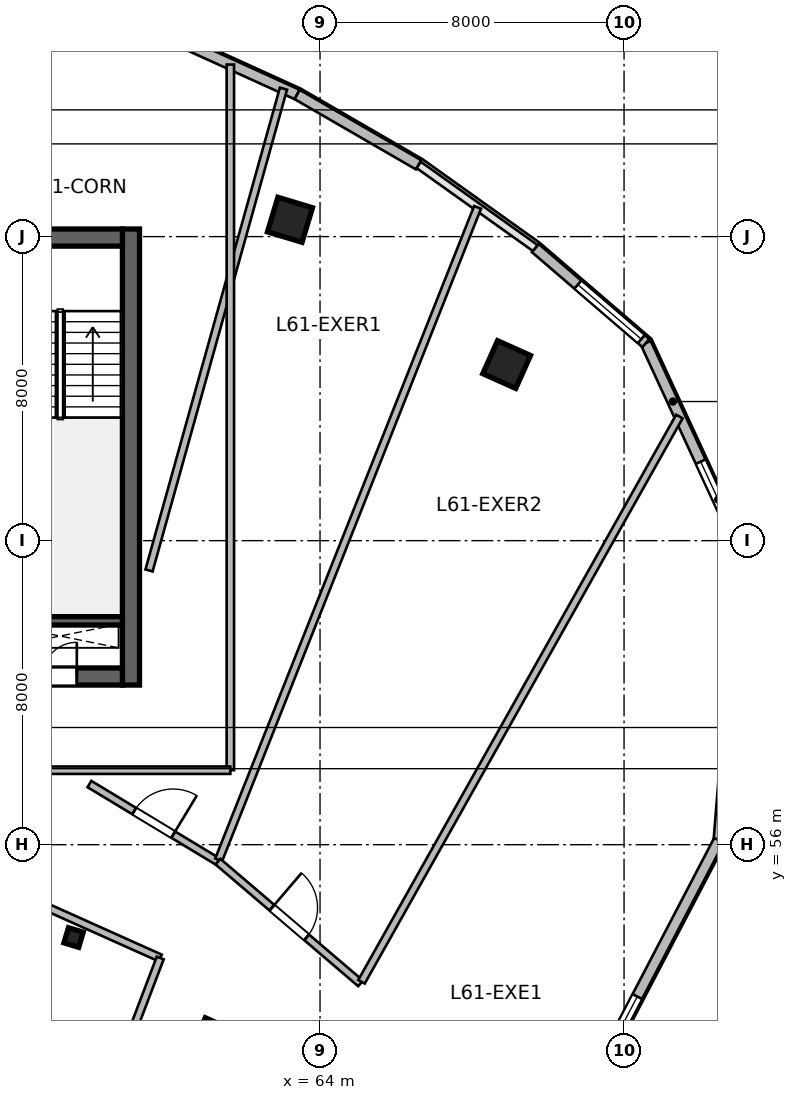
"""IFC4 building model, lengths in metres.
Left out: names, types, materials, properties, quantities, classifications, styles, units other than length and angle.
Written with IfcOpenShell. Run it as: python <this file> out.ifc"""

import sys

from ifc_helpers import new_model, si_unit, direction, frame, frame_2d, origin, origin_2d, place, context, subcontext, project, spatial, rectangle, i_section, extrude, source, transform, mapped, element, fill, save


model = new_model("IFC4")
c1 = context("Model", 3, precision=1e-05, world=origin(), true_north=direction((0.0, 1.0)))
c2 = subcontext(c1, "Body", "Model", "MODEL_VIEW")
j1 = project(units=[si_unit("LENGTHUNIT", "METRE"), si_unit("PLANEANGLEUNIT", "RADIAN")], contexts=[c1])
p1 = place(None, origin())
s1 = spatial("IfcSite", under=j1, at=p1, CompositionType="ELEMENT")
p2 = place(p1, origin())
s2 = spatial("IfcBuilding", under=s1, at=p2, CompositionType="ELEMENT")
p3 = place(p2, frame((0.0, 0.0, 250.8)))
s3 = spatial("IfcBuildingStorey", under=s2, at=p3, CompositionType="ELEMENT", Elevation=250.8)
m1 = source(origin(), c2, "Body", "SweptSolid", [
    extrude(rectangle(XDim=12.0, YDim=0.45, at=frame_2d((6.0, 0.0))), origin(), (0.0, 0.0, 1.0), 3.9),
])
p4 = place(p3, frame((59.025, 60.2, 0.0), z_axis=(0.0, 0.0, 1.0), x_axis=(0.0, 1.0, 0.0)))
e1 = element("IfcWall", 1, at=p4, inside=s3, PredefinedType="SHEAR", context=c2, shape_type="MappedRepresentation", body=[
    mapped(m1, transform((0.0, 0.0, 0.0), scale=1.0)),
])
m2 = source(origin(), c2, "Body", "SweptSolid", [
    extrude(rectangle(XDim=21.6, YDim=0.45, at=frame_2d((10.8, 0.0))), origin(), (0.0, 0.0, 1.0), 3.9),
])
p5 = place(p3, frame((37.2, 60.425, 0.0), z_axis=(0.0, 0.0, 1.0), x_axis=(1.0, 0.0, 0.0)))
e2 = element("IfcWall", 2, at=p5, inside=s3, PredefinedType="SHEAR", context=c2, shape_type="MappedRepresentation", body=[
    mapped(m2, transform((0.0, 0.0, 0.0), scale=1.0)),
])
p6 = place(p5, frame((1.1, 0.0, 0.0)))
e3 = element("IfcOpeningElement", 3, at=p6, cuts=e2, PredefinedType="OPENING", context=c2, shape_type="SweptSolid", body=[
    extrude(rectangle(XDim=1.15, YDim=2.15, at=frame_2d((0.575, 1.075))), frame((0.0, 0.235, 0.0), z_axis=(0.0, -1.0, 0.0), x_axis=(1.0, 0.0, 0.0)), (0.0, 0.0, 1.0), 0.47),
])
p7 = place(p5, frame((19.5, 0.0, 0.0)))
e4 = element("IfcOpeningElement", 4, at=p7, cuts=e2, PredefinedType="OPENING", context=c2, shape_type="SweptSolid", body=[
    extrude(rectangle(XDim=0.9, YDim=2.1, at=frame_2d((0.45, 1.05))), frame((0.0, 0.235, 0.0), z_axis=(0.0, -1.0, 0.0), x_axis=(1.0, 0.0, 0.0)), (0.0, 0.0, 1.0), 0.47),
])
p8 = place(p5, frame((12.02, 0.0, 0.0)))
e5 = element("IfcOpeningElement", 5, at=p8, cuts=e2, PredefinedType="OPENING", context=c2, shape_type="SweptSolid", body=[
    extrude(rectangle(XDim=1.6, YDim=2.15, at=frame_2d((0.8, 1.075))), frame((0.0, 0.235, 0.0), z_axis=(0.0, -1.0, 0.0), x_axis=(1.0, 0.0, 0.0)), (0.0, 0.0, 1.0), 0.47),
])
p9 = place(p3, frame((37.2, 71.975, 0.0), z_axis=(0.0, 0.0, 1.0), x_axis=(1.0, 0.0, 0.0)))
e6 = element("IfcWall", 6, at=p9, inside=s3, PredefinedType="SHEAR", context=c2, shape_type="MappedRepresentation", body=[
    mapped(m2, transform((0.0, 0.0, 0.0), scale=1.0)),
])
p10 = place(p9, frame((1.2, 0.0, 0.0)))
e7 = element("IfcOpeningElement", 7, at=p10, cuts=e6, PredefinedType="OPENING", context=c2, shape_type="SweptSolid", body=[
    extrude(rectangle(XDim=0.9, YDim=2.1, at=frame_2d((0.45, 1.05))), frame((0.0, 0.235, 0.0), z_axis=(0.0, -1.0, 0.0), x_axis=(1.0, 0.0, 0.0)), (0.0, 0.0, 1.0), 0.47),
])
p11 = place(p9, frame((14.7, 0.0, 0.0)))
e8 = element("IfcOpeningElement", 8, at=p11, cuts=e6, PredefinedType="OPENING", context=c2, shape_type="SweptSolid", body=[
    extrude(rectangle(XDim=1.2, YDim=2.15, at=frame_2d((0.6, 1.075))), frame((0.0, 0.235, 0.0), z_axis=(0.0, -1.0, 0.0), x_axis=(1.0, 0.0, 0.0)), (0.0, 0.0, 1.0), 0.47),
])
p12 = place(p9, frame((4.15, 0.0, 0.0)))
e9 = element("IfcOpeningElement", 9, at=p12, cuts=e6, PredefinedType="OPENING", context=c2, shape_type="SweptSolid", body=[
    extrude(rectangle(XDim=1.3, YDim=2.15, at=frame_2d((0.65, 1.075))), frame((0.0, 0.235, 0.0), z_axis=(0.0, -1.0, 0.0), x_axis=(1.0, 0.0, 0.0)), (0.0, 0.0, 1.0), 0.47),
])
p13 = place(p9, frame((7.25, 0.0, 0.0)))
e10 = element("IfcOpeningElement", 10, at=p13, cuts=e6, PredefinedType="OPENING", context=c2, shape_type="SweptSolid", body=[
    extrude(rectangle(XDim=0.9, YDim=2.1, at=frame_2d((0.45, 1.05))), frame((0.0, 0.235, 0.0), z_axis=(0.0, -1.0, 0.0), x_axis=(1.0, 0.0, 0.0)), (0.0, 0.0, 1.0), 0.47),
])
m3 = source(origin(), c2, "Body", "SweptSolid", [
    extrude(rectangle(XDim=3.27, YDim=0.22, at=frame_2d((1.635, 0.0))), origin(), (0.0, 0.0, 1.0), 3.9),
])
p14 = place(p3, frame((55.53, 61.89, 0.0), z_axis=(0.0, 0.0, 1.0), x_axis=(1.0, 0.0, 0.0)))
e11 = element("IfcWall", 11, at=p14, inside=s3, PredefinedType="SHEAR", context=c2, shape_type="MappedRepresentation", body=[
    mapped(m3, transform((0.0, 0.0, 0.0), scale=1.0)),
])
m4 = source(origin(), c2, "Body", "SweptSolid", [
    extrude(i_section(OverallWidth=0.406, OverallDepth=0.416, WebThickness=0.03, FlangeThickness=0.048, at=origin_2d()), origin(), (0.0, 0.0, 1.0), 3.9),
])
p15 = place(p3, frame((57.515, 53.558, 0.0), z_axis=(0.0, 0.0, 1.0), x_axis=(0.288697611798, 0.957420330337, 0.0)))
e12 = element("IfcColumn", 12, at=p15, inside=s3, PredefinedType="COLUMN", context=c2, shape_type="MappedRepresentation", body=[
    mapped(m4, transform((0.0, 0.0, 0.0), scale=1.0)),
])
m5 = source(origin(), c2, "Body", "SweptSolid", [
    extrude(rectangle(XDim=0.95, YDim=0.95, at=origin_2d()), origin(), (0.0, 0.0, 1.0), 3.9),
])
p16 = place(p3, frame((63.209, 72.442, 0.0), z_axis=(0.0, 0.0, 1.0), x_axis=(0.288697611798, 0.957420330337, 0.0)))
e13 = element("IfcColumn", 13, at=p16, inside=s3, PredefinedType="COLUMN", context=c2, shape_type="MappedRepresentation", body=[
    mapped(m5, transform((0.0, 0.0, 0.0), scale=1.0)),
])
p17 = place(p3, frame((61.082, 51.175, 0.0), z_axis=(0.0, 0.0, 1.0), x_axis=(0.409126902895, 0.912477494148, 0.0)))
e14 = element("IfcColumn", 14, at=p17, inside=s3, PredefinedType="COLUMN", context=c2, shape_type="MappedRepresentation", body=[
    mapped(m4, transform((0.0, 0.0, 0.0), scale=1.0)),
])
p18 = place(p3, frame((68.91, 68.633, 0.0), z_axis=(0.0, 0.0, 1.0), x_axis=(0.409126902895, 0.912477494148, 0.0)))
e15 = element("IfcColumn", 15, at=p18, inside=s3, PredefinedType="COLUMN", context=c2, shape_type="MappedRepresentation", body=[
    mapped(m5, transform((0.0, 0.0, 0.0), scale=1.0)),
])
m6 = source(origin(), c2, "Body", "SweptSolid", [
    extrude(rectangle(XDim=6.05, YDim=0.28, at=frame_2d((3.025, 0.0))), origin(), (0.0, 0.0, 1.0), 3.58),
])
p19 = place(p3, frame((72.574, 69.198, 0.0), z_axis=(0.0, 0.0, 1.0), x_axis=(0.41942922905, -0.907788037935, 0.0)))
e16 = element("IfcWall", 16, at=p19, inside=s3, PredefinedType="SOLIDWALL", context=c2, shape_type="MappedRepresentation", body=[
    mapped(m6, transform((0.0, 0.0, 0.0), scale=1.0)),
])
p20 = place(p19, frame((3.437, 0.0, 0.95)))
e17 = element("IfcOpeningElement", 17, at=p20, cuts=e16, PredefinedType="OPENING", context=c2, shape_type="SweptSolid", body=[
    extrude(rectangle(XDim=2.2, YDim=2.1, at=frame_2d((1.1, 1.05))), frame((0.0, 0.15, 0.0), z_axis=(0.0, -1.0, 0.0), x_axis=(1.0, 0.0, 0.0)), (0.0, 0.0, 1.0), 0.3),
])
m7 = source(origin(), c2, "Body", "SweptSolid", [
    extrude(rectangle(XDim=7.618, YDim=0.28, at=frame_2d((3.809, 0.0))), origin(), (0.0, 0.0, 1.0), 3.58),
])
p21 = place(p3, frame((75.112, 63.707, 0.0), z_axis=(0.0, 0.0, 1.0), x_axis=(-0.080820171031, -0.996728699273, 0.0)))
e18 = element("IfcWall", 18, at=p21, inside=s3, PredefinedType="SOLIDWALL", context=c2, shape_type="MappedRepresentation", body=[
    mapped(m7, transform((0.0, 0.0, 0.0), scale=1.0)),
])
p22 = place(p21, frame((0.805, 0.0, 0.95)))
e19 = element("IfcOpeningElement", 19, at=p22, cuts=e18, PredefinedType="OPENING", context=c2, shape_type="SweptSolid", body=[
    extrude(rectangle(XDim=2.2, YDim=2.1, at=frame_2d((1.1, 1.05))), frame((0.0, 0.15, 0.0), z_axis=(0.0, -1.0, 0.0), x_axis=(1.0, 0.0, 0.0)), (0.0, 0.0, 1.0), 0.3),
])
m8 = source(origin(), c2, "Body", "SweptSolid", [
    extrude(rectangle(XDim=7.648, YDim=0.28, at=frame_2d((3.824, 0.0))), origin(), (0.0, 0.0, 1.0), 3.58),
])
p23 = place(p3, frame((74.496, 56.113, 0.0), z_axis=(0.0, 0.0, 1.0), x_axis=(-0.463116873665, -0.886297219519, 0.0)))
e20 = element("IfcWall", 20, at=p23, inside=s3, PredefinedType="SOLIDWALL", context=c2, shape_type="MappedRepresentation", body=[
    mapped(m8, transform((0.0, 0.0, 0.0), scale=1.0)),
])
p24 = place(p23, frame((4.636, 0.0, 0.95)))
e21 = element("IfcOpeningElement", 21, at=p24, cuts=e20, PredefinedType="OPENING", context=c2, shape_type="SweptSolid", body=[
    extrude(rectangle(XDim=2.2, YDim=2.1, at=frame_2d((1.1, 1.05))), frame((0.0, 0.15, 0.0), z_axis=(0.0, -1.0, 0.0), x_axis=(1.0, 0.0, 0.0)), (0.0, 0.0, 1.0), 0.3),
])
m9 = source(origin(), c2, "Body", "SweptSolid", [
    extrude(rectangle(XDim=3.619, YDim=0.28, at=frame_2d((1.81, 0.0))), origin(), (0.0, 0.0, 1.0), 3.58),
])
p25 = place(p3, frame((60.103, 77.237, 0.0), z_axis=(0.0, 0.0, 1.0), x_axis=(0.910479634963, -0.413553907391, 0.0)))
e22 = element("IfcWall", 22, at=p25, inside=s3, PredefinedType="SOLIDWALL", context=c2, shape_type="MappedRepresentation", body=[
    mapped(m9, transform((0.0, 0.0, 0.0), scale=1.0)),
])
m10 = source(origin(), c2, "Body", "SweptSolid", [
    extrude(rectangle(XDim=3.692, YDim=0.28, at=frame_2d((1.846, 0.0))), origin(), (0.0, 0.0, 1.0), 3.58),
])
p26 = place(p3, frame((63.398, 75.74, 0.0), z_axis=(0.0, 0.0, 1.0), x_axis=(0.86534327136, -0.501179631181, 0.0)))
e23 = element("IfcWall", 23, at=p26, inside=s3, PredefinedType="SOLIDWALL", context=c2, shape_type="MappedRepresentation", body=[
    mapped(m10, transform((0.0, 0.0, 0.0), scale=1.0)),
])
m11 = source(origin(), c2, "Body", "SweptSolid", [
    extrude(rectangle(XDim=3.834, YDim=0.28, at=frame_2d((1.917, 0.0))), origin(), (0.0, 0.0, 1.0), 3.58),
])
p27 = place(p3, frame((69.667, 71.697, 0.0), z_axis=(0.0, 0.0, 1.0), x_axis=(0.75839292431, -0.651797646787, 0.0)))
e24 = element("IfcWall", 24, at=p27, inside=s3, PredefinedType="SOLIDWALL", context=c2, shape_type="MappedRepresentation", body=[
    mapped(m11, transform((0.0, 0.0, 0.0), scale=1.0)),
])
p28 = place(p27, frame((1.474, 0.0, 0.95)))
e25 = element("IfcOpeningElement", 25, at=p28, cuts=e24, PredefinedType="OPENING", context=c2, shape_type="SweptSolid", body=[
    extrude(rectangle(XDim=2.2, YDim=2.1, at=frame_2d((1.1, 1.05))), frame((0.0, 0.15, 0.0), z_axis=(0.0, -1.0, 0.0), x_axis=(1.0, 0.0, 0.0)), (0.0, 0.0, 1.0), 0.3),
])
m12 = source(origin(), c2, "Body", "SweptSolid", [
    extrude(rectangle(XDim=7.982, YDim=0.195, at=frame_2d((3.991, 0.0))), origin(), (0.0, 0.0, 1.0), 3.58),
])
p29 = place(p3, frame((52.511, 56.284, 0.0), z_axis=(0.0, 0.0, 1.0), x_axis=(0.91248609472, -0.409107720464, 0.0)))
e26 = element("IfcWall", 26, at=p29, inside=s3, PredefinedType="PARTITIONING", context=c2, shape_type="MappedRepresentation", body=[
    mapped(m12, transform((0.0, 0.0, 0.0), scale=1.0)),
])
p30 = place(p29, frame((3.441, 0.0, 0.0)))
e27 = element("IfcOpeningElement", 27, at=p30, cuts=e26, PredefinedType="OPENING", context=c2, shape_type="SweptSolid", body=[
    extrude(rectangle(XDim=1.1, YDim=2.15, at=frame_2d((0.55, 1.075))), frame((0.0, 0.107, 0.0), z_axis=(0.0, -1.0, 0.0), x_axis=(1.0, 0.0, 0.0)), (0.0, 0.0, 1.0), 0.215),
])
m13 = source(origin(), c2, "Body", "SweptSolid", [
    extrude(rectangle(XDim=3.757, YDim=0.195, at=frame_2d((1.879, 0.0))), origin(), (0.0, 0.0, 1.0), 3.58),
])
p31 = place(p3, frame((58.459, 49.507, 0.0), z_axis=(0.0, 0.0, 1.0), x_axis=(0.355427833237, 0.93470372598, 0.0)))
e28 = element("IfcWall", 28, at=p31, inside=s3, PredefinedType="PARTITIONING", context=c2, shape_type="MappedRepresentation", body=[
    mapped(m13, transform((0.0, 0.0, 0.0), scale=1.0)),
])
m14 = source(origin(), c2, "Body", "SweptSolid", [
    extrude(rectangle(XDim=3.951, YDim=0.195, at=frame_2d((1.975, 0.0))), origin(), (0.0, 0.0, 1.0), 3.58),
])
p32 = place(p3, frame((57.932, 57.596, 0.0), z_axis=(0.0, 0.0, 1.0), x_axis=(0.856137696849, -0.51674775668, 0.0)))
e29 = element("IfcWall", 29, at=p32, inside=s3, PredefinedType="PARTITIONING", context=c2, shape_type="MappedRepresentation", body=[
    mapped(m14, transform((0.0, 0.0, 0.0), scale=1.0)),
])
p33 = place(p32, frame((1.375, 0.0, 0.0)))
e30 = element("IfcOpeningElement", 30, at=p33, cuts=e29, PredefinedType="OPENING", context=c2, shape_type="SweptSolid", body=[
    extrude(rectangle(XDim=1.2, YDim=2.15, at=frame_2d((0.6, 1.075))), frame((0.0, 0.107, 0.0), z_axis=(0.0, -1.0, 0.0), x_axis=(1.0, 0.0, 0.0)), (0.0, 0.0, 1.0), 0.215),
])
m15 = source(origin(), c2, "Body", "SweptSolid", [
    extrude(rectangle(XDim=13.161, YDim=0.195, at=frame_2d((6.581, 0.0))), origin(), (0.0, 0.0, 1.0), 3.58),
])
p34 = place(p3, frame((59.5, 63.216, 0.0), z_axis=(0.0, 0.0, 1.0), x_axis=(0.268752541286, 0.963209256368, 0.0)))
e31 = element("IfcWall", 31, at=p34, inside=s3, PredefinedType="PARTITIONING", context=c2, shape_type="MappedRepresentation", body=[
    mapped(m15, transform((0.0, 0.0, 0.0), scale=1.0)),
])
m16 = source(origin(), c2, "Body", "SweptSolid", [
    extrude(rectangle(XDim=18.471, YDim=0.195, at=frame_2d((9.235, 0.0))), origin(), (0.0, 0.0, 1.0), 3.58),
])
p35 = place(p3, frame((61.333, 55.602, 0.0), z_axis=(0.0, 0.0, 1.0), x_axis=(0.368827756565, 0.929497760076, 0.0)))
e32 = element("IfcWall", 32, at=p35, inside=s3, PredefinedType="PARTITIONING", context=c2, shape_type="MappedRepresentation", body=[
    mapped(m16, transform((0.0, 0.0, 0.0), scale=1.0)),
])
m17 = source(origin(), c2, "Body", "SweptSolid", [
    extrude(rectangle(XDim=4.935, YDim=0.195, at=frame_2d((2.467, 0.0))), origin(), (0.0, 0.0, 1.0), 3.58),
])
p36 = place(p3, frame((61.314, 55.554, 0.0), z_axis=(0.0, 0.0, 1.0), x_axis=(0.760547222161, -0.649282621716, 0.0)))
e33 = element("IfcWall", 33, at=p36, inside=s3, PredefinedType="PARTITIONING", context=c2, shape_type="MappedRepresentation", body=[
    mapped(m17, transform((0.0, 0.0, 0.0), scale=1.0)),
])
p37 = place(p36, frame((1.867, 0.0, 0.0)))
e34 = element("IfcOpeningElement", 34, at=p37, cuts=e33, PredefinedType="OPENING", context=c2, shape_type="SweptSolid", body=[
    extrude(rectangle(XDim=1.2, YDim=2.15, at=frame_2d((0.6, 1.075))), frame((0.0, 0.107, 0.0), z_axis=(0.0, -1.0, 0.0), x_axis=(1.0, 0.0, 0.0)), (0.0, 0.0, 1.0), 0.215),
])
m18 = source(origin(), c2, "Body", "SweptSolid", [
    extrude(rectangle(XDim=17.064, YDim=0.195, at=frame_2d((8.532, 0.0))), origin(), (0.0, 0.0, 1.0), 3.58),
])
p38 = place(p3, frame((65.092, 52.393, 0.0), z_axis=(0.0, 0.0, 1.0), x_axis=(0.490167496501, 0.871628261, 0.0)))
e35 = element("IfcWall", 35, at=p38, inside=s3, PredefinedType="PARTITIONING", context=c2, shape_type="MappedRepresentation", body=[
    mapped(m18, transform((0.0, 0.0, 0.0), scale=1.0)),
])
m19 = source(origin(), c2, "Body", "SweptSolid", [
    extrude(rectangle(XDim=18.567, YDim=0.195, at=frame_2d((9.284, 0.0))), origin(), (0.0, 0.0, 1.0), 3.58),
])
p39 = place(p3, frame((61.64, 57.96, 0.0), z_axis=(0.0, 0.0, 1.0), x_axis=(0.0, 1.0, 0.0)))
e36 = element("IfcWall", 36, at=p39, inside=s3, PredefinedType="PARTITIONING", context=c2, shape_type="MappedRepresentation", body=[
    mapped(m19, transform((0.0, 0.0, 0.0), scale=1.0)),
])
m20 = source(origin(), c2, "Body", "SweptSolid", [
    extrude(rectangle(XDim=12.39, YDim=0.195, at=frame_2d((6.195, 0.0))), origin(), (0.0, 0.0, 1.0), 3.58),
])
p40 = place(p3, frame((49.25, 57.96, 0.0), z_axis=(0.0, 0.0, 1.0), x_axis=(1.0, 0.0, 0.0)))
e37 = element("IfcWall", 37, at=p40, inside=s3, PredefinedType="PARTITIONING", context=c2, shape_type="MappedRepresentation", body=[
    mapped(m20, transform((0.0, 0.0, 0.0), scale=1.0)),
])
m21 = source(origin(), c2, "Body", "SweptSolid", [
    extrude(rectangle(XDim=2.2, YDim=2.1, at=frame_2d((1.1, 1.05))), frame((0.0, 0.03, 0.0), z_axis=(0.0, -1.0, 0.0), x_axis=(1.0, 0.0, 0.0)), (0.0, 0.0, 1.0), 0.06),
])
p41 = place(p20, origin())
e38 = element("IfcWindow", 38, at=p41, inside=s3, PartitioningType="TRIPLE_PANEL_VERTICAL", PredefinedType="WINDOW", context=c2, shape_type="MappedRepresentation", body=[
    mapped(m21, transform((0.0, 0.0, 0.0), scale=1.0)),
])
fill(e17, e38)
p42 = place(p24, origin())
e39 = element("IfcWindow", 39, at=p42, inside=s3, PartitioningType="TRIPLE_PANEL_VERTICAL", PredefinedType="WINDOW", context=c2, shape_type="MappedRepresentation", body=[
    mapped(m21, transform((0.0, 0.0, 0.0), scale=1.0)),
])
fill(e21, e39)
p43 = place(p28, origin())
e40 = element("IfcWindow", 40, at=p43, inside=s3, PartitioningType="TRIPLE_PANEL_VERTICAL", PredefinedType="WINDOW", context=c2, shape_type="MappedRepresentation", body=[
    mapped(m21, transform((0.0, 0.0, 0.0), scale=1.0)),
])
fill(e25, e40)
m22 = source(origin(), c2, "Body", "SweptSolid", [
    extrude(rectangle(XDim=0.9, YDim=2.1, at=frame_2d((0.45, 1.05))), frame((0.0, 0.025, 0.0), z_axis=(0.0, -1.0, 0.0), x_axis=(1.0, 0.0, 0.0)), (0.0, 0.0, 1.0), 0.05),
])
p44 = place(p7, origin())
e41 = element("IfcDoor", 41, at=p44, inside=s3, OperationType="SINGLE_SWING_RIGHT", PredefinedType="DOOR", context=c2, shape_type="MappedRepresentation", body=[
    mapped(m22, transform((0.0, 0.0, 0.0), scale=1.0)),
])
fill(e4, e41)
m23 = source(origin(), c2, "Body", "SweptSolid", [
    extrude(rectangle(XDim=1.2, YDim=2.15, at=frame_2d((0.6, 1.075))), frame((0.0, 0.025, 0.0), z_axis=(0.0, -1.0, 0.0), x_axis=(1.0, 0.0, 0.0)), (0.0, 0.0, 1.0), 0.05),
])
p45 = place(p33, origin())
e42 = element("IfcDoor", 42, at=p45, inside=s3, OperationType="SINGLE_SWING_RIGHT", PredefinedType="DOOR", context=c2, shape_type="MappedRepresentation", body=[
    mapped(m23, transform((0.0, 0.0, 0.0), scale=1.0)),
])
fill(e30, e42)
p46 = place(p37, origin())
e43 = element("IfcDoor", 43, at=p46, inside=s3, OperationType="SINGLE_SWING_LEFT", PredefinedType="DOOR", context=c2, shape_type="MappedRepresentation", body=[
    mapped(m23, transform((0.0, 0.0, 0.0), scale=1.0)),
])
fill(e34, e43)
save(model, sys.argv[1])
